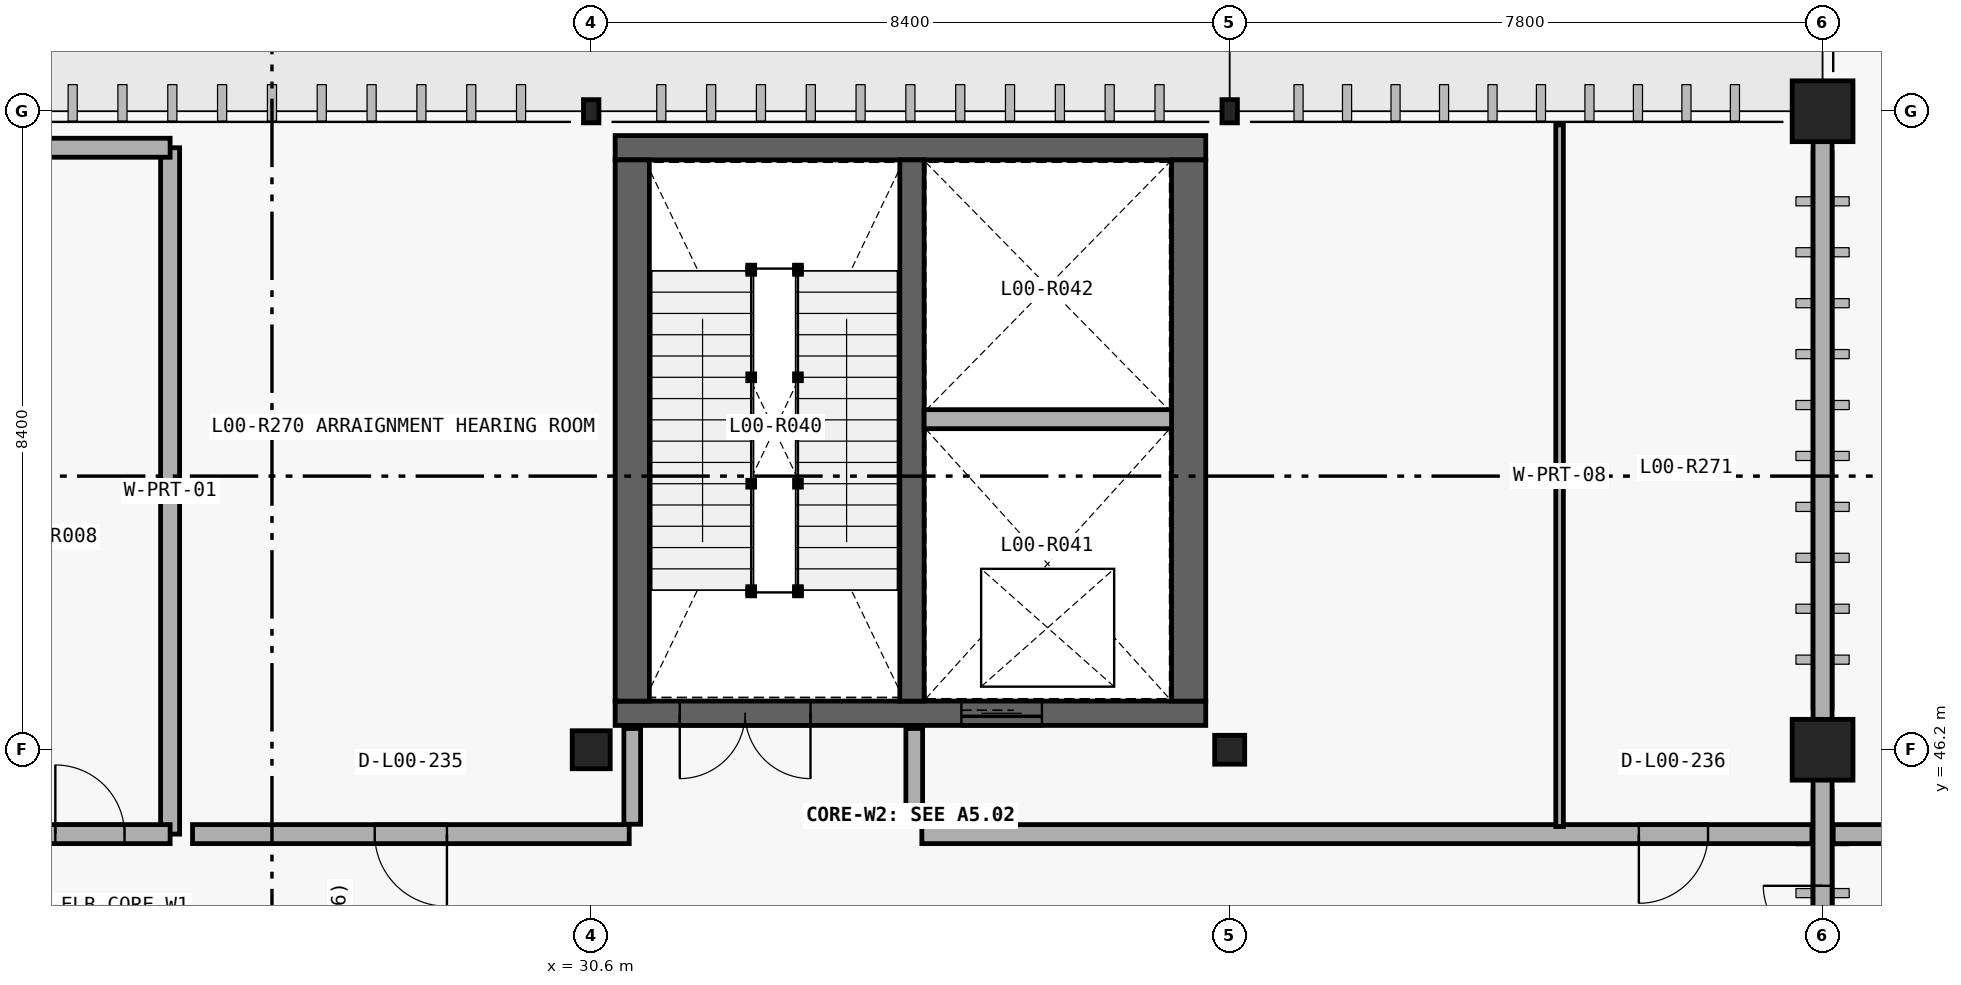
"""IFC4 building model, lengths in metres.
Left out: names, types, materials, properties, quantities, classifications, styles, units other than length and angle.
Written with IfcOpenShell. Run it as: python <this file> out.ifc"""

import sys

from ifc_helpers import new_model, si_unit, direction, frame, frame_2d, origin_with_axes, origin_2d_with_axis, place, context, subcontext, project, spatial, rectangle, hollow_rectangle, circle, i_section, extrude, element, fill, save


model = new_model("IFC4")
c1 = context("Model", 3, precision=1e-05, world=origin_with_axes(), true_north=direction((0.0, 1.0)))
c2 = subcontext(c1, "Body", "Model", "MODEL_VIEW")
j1 = project(units=[si_unit("LENGTHUNIT", "METRE"), si_unit("PLANEANGLEUNIT", "RADIAN")], contexts=[c1])
p1 = place(None, origin_with_axes())
s1 = spatial("IfcSite", under=j1, at=p1, CompositionType="ELEMENT")
p2 = place(p1, origin_with_axes())
s2 = spatial("IfcBuilding", under=s1, at=p2, CompositionType="ELEMENT")
p3 = place(p2, origin_with_axes())
s3 = spatial("IfcBuildingStorey", under=s2, at=p3, CompositionType="ELEMENT", Elevation=0.0)
p4 = place(None, frame((25.06, 45.09, 0.0), z_axis=(0.0, 0.0, 1.0), x_axis=(0.0, 1.0, 0.0)))
e1 = element("IfcWall", 1, at=p4, inside=s3, PredefinedType="PARTITIONING", context=c2, shape_type="SweptSolid", body=[
    extrude(rectangle(XDim=9.03, YDim=0.25, at=frame_2d((4.515, 0.0), x_axis=(1.0, 0.0))), origin_with_axes(), (0.0, 0.0, 1.0), 5.08),
])
p5 = place(None, frame((21.7, 54.12, 0.0), z_axis=(0.0, 0.0, 1.0), x_axis=(1.0, 0.0, 0.0)))
e2 = element("IfcWall", 2, at=p5, inside=s3, PredefinedType="PARTITIONING", context=c2, shape_type="SweptSolid", body=[
    extrude(rectangle(XDim=3.36, YDim=0.25, at=frame_2d((1.68, 0.0), x_axis=(1.0, 0.0))), origin_with_axes(), (0.0, 0.0, 1.0), 5.08),
])
p6 = place(None, frame((21.7, 45.09, 0.0), z_axis=(0.0, 0.0, 1.0), x_axis=(1.0, 0.0, 0.0)))
e3 = element("IfcWall", 3, at=p6, inside=s3, PredefinedType="PARTITIONING", context=c2, shape_type="SweptSolid", body=[
    extrude(rectangle(XDim=3.36, YDim=0.25, at=frame_2d((1.68, 0.0), x_axis=(1.0, 0.0))), origin_with_axes(), (0.0, 0.0, 1.0), 5.08),
])
p7 = place(None, frame((24.005, 45.09, 0.0), z_axis=(0.0, 0.0, 1.0), x_axis=(1.0, 0.0, 0.0)))
e4 = element("IfcOpeningElement", 4, at=p7, cuts=e3, PredefinedType="OPENING", context=c2, shape_type="SweptSolid", body=[
    extrude(rectangle(XDim=0.91, YDim=2.12, at=frame_2d((0.0, 1.06), x_axis=(1.0, 0.0))), frame((0.0, 0.135, 0.0), z_axis=(0.0, -1.0, 0.0), x_axis=(1.0, 0.0, 0.0)), (0.0, 0.0, 1.0), 0.27),
])
p8 = place(None, frame((30.915, 46.68, 0.0), z_axis=(0.0, 0.0, 1.0), x_axis=(1.0, 0.0, 0.0)))
e5 = element("IfcWall", 5, at=p8, inside=s3, PredefinedType="SHEAR", context=c2, shape_type="SweptSolid", body=[
    extrude(rectangle(XDim=7.77, YDim=0.32, at=frame_2d((3.885, 0.0), x_axis=(1.0, 0.0))), origin_with_axes(), (0.0, 0.0, 1.0), 5.4),
])
p9 = place(None, frame((32.625, 46.68, 0.0), z_axis=(0.0, 0.0, 1.0), x_axis=(1.0, 0.0, 0.0)))
e6 = element("IfcOpeningElement", 6, at=p9, cuts=e5, PredefinedType="OPENING", context=c2, shape_type="SweptSolid", body=[
    extrude(rectangle(XDim=1.72, YDim=2.18, at=frame_2d((0.0, 1.09), x_axis=(1.0, 0.0))), frame((0.0, 0.17, 0.0), z_axis=(0.0, -1.0, 0.0), x_axis=(1.0, 0.0, 0.0)), (0.0, 0.0, 1.0), 0.34),
])
p10 = place(None, frame((36.0, 46.68, 0.0), z_axis=(0.0, 0.0, 1.0), x_axis=(1.0, 0.0, 0.0)))
e7 = element("IfcOpeningElement", 7, at=p10, cuts=e5, PredefinedType="OPENING", context=c2, shape_type="SweptSolid", body=[
    extrude(rectangle(XDim=1.06, YDim=2.16, at=frame_2d((0.0, 1.08), x_axis=(1.0, 0.0))), frame((0.0, 0.17, 0.0), z_axis=(0.0, -1.0, 0.0), x_axis=(1.0, 0.0, 0.0)), (0.0, 0.0, 1.0), 0.34),
])
p11 = place(None, frame((38.685, 54.12, 0.0), z_axis=(0.0, 0.0, 1.0), x_axis=(-1.0, 0.0, 0.0)))
e8 = element("IfcWall", 8, at=p11, inside=s3, PredefinedType="SHEAR", context=c2, shape_type="SweptSolid", body=[
    extrude(rectangle(XDim=7.77, YDim=0.32, at=frame_2d((3.885, 0.0), x_axis=(1.0, 0.0))), origin_with_axes(), (0.0, 0.0, 1.0), 5.4),
])
for number, where, z_axis, x_axis in (
    (9, (38.46, 46.84, 0.0), (0.0, 0.0, 1.0), (0.0, 1.0, 0.0)),
    (10, (31.14, 53.96, 0.0), (0.0, 0.0, 1.0), (0.0, -1.0, 0.0)),
):
    element("IfcWall", number, at=place(None, frame(where, z_axis=z_axis, x_axis=x_axis)), inside=s3, PredefinedType="SHEAR", context=c2, shape_type="SweptSolid", body=[
        extrude(rectangle(XDim=7.12, YDim=0.45, at=frame_2d((3.56, 0.0), x_axis=(1.0, 0.0))), origin_with_axes(), (0.0, 0.0, 1.0), 5.4),
    ])
p12 = place(None, frame((34.82, 46.84, 0.0), z_axis=(0.0, 0.0, 1.0), x_axis=(0.0, 1.0, 0.0)))
e11 = element("IfcWall", 11, at=p12, inside=s3, PredefinedType="SHEAR", context=c2, shape_type="SweptSolid", body=[
    extrude(rectangle(XDim=7.12, YDim=0.32, at=frame_2d((3.56, 0.0), x_axis=(1.0, 0.0))), origin_with_axes(), (0.0, 0.0, 1.0), 5.4),
])
p13 = place(None, frame((34.98, 50.549, 0.0), z_axis=(0.0, 0.0, 1.0), x_axis=(1.0, 0.0, 0.0)))
e12 = element("IfcWall", 12, at=p13, inside=s3, PredefinedType="PARTITIONING", context=c2, shape_type="SweptSolid", body=[
    extrude(rectangle(XDim=3.255, YDim=0.25, at=frame_2d((1.627, 0.0), x_axis=(1.0, 0.0))), origin_with_axes(), (0.0, 0.0, 1.0), 5.08),
])
p14 = place(None, frame((46.8, 39.05, 0.0), z_axis=(0.0, 0.0, 1.0), x_axis=(0.0, 1.0, 0.0)))
e13 = element("IfcWall", 13, at=p14, inside=s3, PredefinedType="PARTITIONING", context=c2, shape_type="SweptSolid", body=[
    extrude(rectangle(XDim=15.5, YDim=0.25, at=frame_2d((7.75, 0.0), x_axis=(1.0, 0.0))), origin_with_axes(), (0.0, 0.0, 1.0), 4.724),
])
p15 = place(None, frame((46.8, 43.63, 0.0), z_axis=(0.0, 0.0, 1.0), x_axis=(0.0, 1.0, 0.0)))
e14 = element("IfcOpeningElement", 14, at=p15, cuts=e13, PredefinedType="OPENING", context=c2, shape_type="SweptSolid", body=[
    extrude(rectangle(XDim=1.56, YDim=2.28, at=frame_2d((0.0, 1.14), x_axis=(1.0, 0.0))), frame((0.0, 0.135, 0.0), z_axis=(0.0, -1.0, 0.0), x_axis=(1.0, 0.0, 0.0)), (0.0, 0.0, 1.0), 0.27),
])
for number, where, z_axis, x_axis in (
    (15, (31.14, 45.22, 0.0), (0.0, 0.0, 1.0), (0.0, 1.0, 0.0)),
    (16, (34.85, 45.22, 0.0), (0.0, 0.0, 1.0), (0.0, 1.0, 0.0)),
):
    element("IfcWall", number, at=place(None, frame(where, z_axis=z_axis, x_axis=x_axis)), inside=s3, PredefinedType="PARTITIONING", context=c2, shape_type="SweptSolid", body=[
        extrude(rectangle(XDim=1.26, YDim=0.22, at=frame_2d((0.63, 0.0), x_axis=(1.0, 0.0))), origin_with_axes(), (0.0, 0.0, 1.0), 5.08),
    ])
p16 = place(None, frame((25.355, 45.09, 0.0), z_axis=(0.0, 0.0, 1.0), x_axis=(1.0, 0.0, 0.0)))
e17 = element("IfcWall", 17, at=p16, inside=s3, PredefinedType="PARTITIONING", context=c2, shape_type="SweptSolid", body=[
    extrude(rectangle(XDim=5.745, YDim=0.25, at=frame_2d((2.873, 0.0), x_axis=(1.0, 0.0))), origin_with_axes(), (0.0, 0.0, 1.0), 5.08),
])
p17 = place(None, frame((28.227, 45.09, 0.0), z_axis=(0.0, 0.0, 1.0), x_axis=(1.0, 0.0, 0.0)))
e18 = element("IfcOpeningElement", 18, at=p17, cuts=e17, PredefinedType="OPENING", context=c2, shape_type="SweptSolid", body=[
    extrude(rectangle(XDim=0.95, YDim=2.16, at=frame_2d((0.0, 1.08), x_axis=(1.0, 0.0))), frame((0.0, 0.135, 0.0), z_axis=(0.0, -1.0, 0.0), x_axis=(1.0, 0.0, 0.0)), (0.0, 0.0, 1.0), 0.27),
])
p18 = place(None, frame((34.95, 45.09, 0.0), z_axis=(0.0, 0.0, 1.0), x_axis=(1.0, 0.0, 0.0)))
e19 = element("IfcWall", 19, at=p18, inside=s3, PredefinedType="PARTITIONING", context=c2, shape_type="SweptSolid", body=[
    extrude(rectangle(XDim=11.71, YDim=0.25, at=frame_2d((5.855, 0.0), x_axis=(1.0, 0.0))), origin_with_axes(), (0.0, 0.0, 1.0), 5.08),
])
p19 = place(None, frame((44.838, 45.09, 0.0), z_axis=(0.0, 0.0, 1.0), x_axis=(1.0, 0.0, 0.0)))
e20 = element("IfcOpeningElement", 20, at=p19, cuts=e19, PredefinedType="OPENING", context=c2, shape_type="SweptSolid", body=[
    extrude(rectangle(XDim=0.91, YDim=2.12, at=frame_2d((0.0, 1.06), x_axis=(1.0, 0.0))), frame((0.0, 0.135, 0.0), z_axis=(0.0, -1.0, 0.0), x_axis=(1.0, 0.0, 0.0)), (0.0, 0.0, 1.0), 0.27),
])
p20 = place(None, frame((43.34, 45.19, 0.0), z_axis=(0.0, 0.0, 1.0), x_axis=(0.0, 1.0, 0.0)))
e21 = element("IfcWall", 21, at=p20, inside=s3, PredefinedType="PARTITIONING", context=c2, shape_type="SweptSolid", body=[
    extrude(rectangle(XDim=9.23, YDim=0.1, at=frame_2d((4.615, 0.0), x_axis=(1.0, 0.0))), origin_with_axes(), (0.0, 0.0, 1.0), 5.08),
])
p21 = place(None, frame((46.94, 45.09, 0.0), z_axis=(0.0, 0.0, 1.0), x_axis=(1.0, 0.0, 0.0)))
e22 = element("IfcWall", 22, at=p21, inside=s3, PredefinedType="PARTITIONING", context=c2, shape_type="SweptSolid", body=[
    extrude(rectangle(XDim=8.76, YDim=0.25, at=frame_2d((4.38, 0.0), x_axis=(1.0, 0.0))), origin_with_axes(), (0.0, 0.0, 1.0), 5.08),
])
p22 = place(None, frame((51.32, 45.09, 0.0), z_axis=(0.0, 0.0, 1.0), x_axis=(1.0, 0.0, 0.0)))
e23 = element("IfcOpeningElement", 23, at=p22, cuts=e22, PredefinedType="OPENING", context=c2, shape_type="SweptSolid", body=[
    extrude(rectangle(XDim=0.92, YDim=2.14, at=frame_2d((0.0, 1.07), x_axis=(1.0, 0.0))), frame((0.0, 0.135, 0.0), z_axis=(0.0, -1.0, 0.0), x_axis=(1.0, 0.0, 0.0)), (0.0, 0.0, 1.0), 0.27),
])
p23 = place(None, frame((30.6, 46.2, 0.0), z_axis=(0.0, 0.0, 1.0), x_axis=(1.0, 0.0, 0.0)))
e24 = element("IfcColumn", 24, at=p23, inside=s3, PredefinedType="COLUMN", context=c2, shape_type="SweptSolid", body=[
    extrude(i_section(OverallWidth=0.5, OverallDepth=0.5, WebThickness=0.022, FlangeThickness=0.036, at=origin_2d_with_axis()), origin_with_axes(), (0.0, 0.0, 1.0), 5.4),
])
p24 = place(None, frame((30.6, 54.6, 0.0), z_axis=(0.0, 0.0, 1.0), x_axis=(1.0, 0.0, 0.0)))
e25 = element("IfcColumn", 25, at=p24, inside=s3, PredefinedType="COLUMN", context=c2, shape_type="SweptSolid", body=[
    extrude(hollow_rectangle(XDim=0.203, YDim=0.305, WallThickness=0.013, InnerFilletRadius=0.025, OuterFilletRadius=0.013, at=origin_2d_with_axis()), origin_with_axes(), (0.0, 0.0, 1.0), 5.4),
])
p25 = place(None, frame((39.0, 46.2, 0.0), z_axis=(0.0, 0.0, 1.0), x_axis=(1.0, 0.0, 0.0)))
e26 = element("IfcColumn", 26, at=p25, inside=s3, PredefinedType="COLUMN", context=c2, shape_type="SweptSolid", body=[
    extrude(i_section(OverallWidth=0.395, OverallDepth=0.38, WebThickness=0.019, FlangeThickness=0.03, at=origin_2d_with_axis()), origin_with_axes(), (0.0, 0.0, 1.0), 5.4),
])
p26 = place(None, frame((39.0, 54.6, 0.0), z_axis=(0.0, 0.0, 1.0), x_axis=(1.0, 0.0, 0.0)))
e27 = element("IfcColumn", 27, at=p26, inside=s3, PredefinedType="COLUMN", context=c2, shape_type="SweptSolid", body=[
    extrude(hollow_rectangle(XDim=0.203, YDim=0.305, WallThickness=0.013, InnerFilletRadius=0.025, OuterFilletRadius=0.013, at=origin_2d_with_axis()), origin_with_axes(), (0.0, 0.0, 1.0), 5.4),
])
for number, where, z_axis, x_axis in (
    (28, (46.8, 46.2, 0.0), (0.0, 0.0, 1.0), (1.0, 0.0, 0.0)),
    (29, (46.8, 54.6, 0.0), (0.0, 0.0, 1.0), (1.0, 0.0, 0.0)),
):
    element("IfcColumn", number, at=place(None, frame(where, z_axis=z_axis, x_axis=x_axis)), inside=s3, PredefinedType="COLUMN", context=c2, shape_type="SweptSolid", body=[
        extrude(circle(Radius=0.4, at=origin_2d_with_axis()), origin_with_axes(), (0.0, 0.0, 1.0), 5.4),
    ])
p27 = place(None, frame((24.005, 45.09, 0.0), z_axis=(0.0, 0.0, 1.0), x_axis=(1.0, 0.0, 0.0)))
e30 = element("IfcDoor", 30, at=p27, inside=s3, OperationType="SINGLE_SWING_LEFT", PredefinedType="DOOR", context=c2, shape_type="SweptSolid", body=[
    extrude(rectangle(XDim=0.91, YDim=2.12, at=frame_2d((0.0, 1.06), x_axis=(1.0, 0.0))), frame((0.0, 0.04, 0.0), z_axis=(0.0, -1.0, 0.0), x_axis=(1.0, 0.0, 0.0)), (0.0, 0.0, 1.0), 0.08),
])
fill(e4, e30)
p28 = place(None, frame((32.625, 46.68, 0.0), z_axis=(0.0, 0.0, 1.0), x_axis=(-1.0, 0.0, 0.0)))
e31 = element("IfcDoor", 31, at=p28, inside=s3, OperationType="DOUBLE_DOOR_SINGLE_SWING", PredefinedType="DOOR", context=c2, shape_type="SweptSolid", body=[
    extrude(rectangle(XDim=1.72, YDim=2.18, at=frame_2d((0.0, 1.09), x_axis=(1.0, 0.0))), frame((0.0, 0.04, 0.0), z_axis=(0.0, -1.0, 0.0), x_axis=(1.0, 0.0, 0.0)), (0.0, 0.0, 1.0), 0.08),
])
fill(e6, e31)
p29 = place(None, frame((36.0, 46.68, 0.0), z_axis=(0.0, 0.0, 1.0), x_axis=(-1.0, 0.0, 0.0)))
e32 = element("IfcDoor", 32, at=p29, inside=s3, OperationType="SLIDING_TO_LEFT", PredefinedType="DOOR", context=c2, shape_type="SweptSolid", body=[
    extrude(rectangle(XDim=1.06, YDim=2.16, at=frame_2d((0.0, 1.08), x_axis=(1.0, 0.0))), frame((0.0, 0.04, 0.0), z_axis=(0.0, -1.0, 0.0), x_axis=(1.0, 0.0, 0.0)), (0.0, 0.0, 1.0), 0.08),
])
fill(e7, e32)
p30 = place(None, frame((46.8, 43.63, 0.0), z_axis=(0.0, 0.0, 1.0), x_axis=(0.0, 1.0, 0.0)))
e33 = element("IfcDoor", 33, at=p30, inside=s3, OperationType="DOUBLE_DOOR_SINGLE_SWING", PredefinedType="DOOR", context=c2, shape_type="SweptSolid", body=[
    extrude(rectangle(XDim=1.56, YDim=2.28, at=frame_2d((0.0, 1.14), x_axis=(1.0, 0.0))), frame((0.0, 0.04, 0.0), z_axis=(0.0, -1.0, 0.0), x_axis=(1.0, 0.0, 0.0)), (0.0, 0.0, 1.0), 0.08),
])
fill(e14, e33)
p31 = place(None, frame((28.227, 45.09, 0.0), z_axis=(0.0, 0.0, 1.0), x_axis=(-1.0, 0.0, 0.0)))
e34 = element("IfcDoor", 34, at=p31, inside=s3, OperationType="SINGLE_SWING_RIGHT", PredefinedType="DOOR", context=c2, shape_type="SweptSolid", body=[
    extrude(rectangle(XDim=0.95, YDim=2.16, at=frame_2d((0.0, 1.08), x_axis=(1.0, 0.0))), frame((0.0, 0.04, 0.0), z_axis=(0.0, -1.0, 0.0), x_axis=(1.0, 0.0, 0.0)), (0.0, 0.0, 1.0), 0.08),
])
fill(e18, e34)
p32 = place(None, frame((44.838, 45.09, 0.0), z_axis=(0.0, 0.0, 1.0), x_axis=(-1.0, 0.0, 0.0)))
e35 = element("IfcDoor", 35, at=p32, inside=s3, OperationType="SINGLE_SWING_LEFT", PredefinedType="DOOR", context=c2, shape_type="SweptSolid", body=[
    extrude(rectangle(XDim=0.91, YDim=2.12, at=frame_2d((0.0, 1.06), x_axis=(1.0, 0.0))), frame((0.0, 0.04, 0.0), z_axis=(0.0, -1.0, 0.0), x_axis=(1.0, 0.0, 0.0)), (0.0, 0.0, 1.0), 0.08),
])
fill(e20, e35)
save(model, sys.argv[1])
